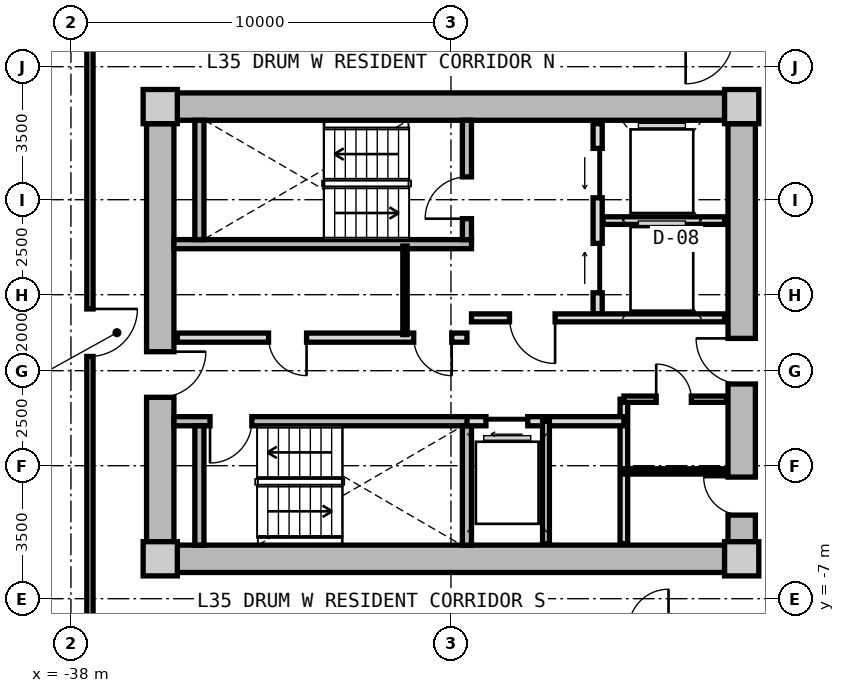
"""IFC4 building model, lengths in metres.
Left out: names, types, materials, properties, quantities, classifications, styles, units other than length and angle.
Written with IfcOpenShell. Run it as: python <this file> out.ifc"""

import sys

from ifc_helpers import new_model, si_unit, direction, frame, frame_2d, origin, origin_2d, place, context, subcontext, project, spatial, rectangle, extrude, source, transform, mapped, element, fill, save


model = new_model("IFC4")
c1 = context("Model", 3, precision=1e-05, world=origin(), true_north=direction((0.0, 1.0)))
c2 = subcontext(c1, "Body", "Model", "MODEL_VIEW")
j1 = project(units=[si_unit("LENGTHUNIT", "METRE"), si_unit("PLANEANGLEUNIT", "RADIAN")], contexts=[c1])
p1 = place(None, origin())
s1 = spatial("IfcSite", under=j1, at=p1, CompositionType="ELEMENT")
p2 = place(p1, origin())
s2 = spatial("IfcBuilding", under=s1, at=p2, CompositionType="ELEMENT")
p3 = place(p2, frame((0.0, 0.0, 114.55)))
s3 = spatial("IfcBuildingStorey", under=s2, at=p3, CompositionType="ELEMENT", Elevation=114.55)
m1 = source(origin(), c2, "Body", "SweptSolid", [
    extrude(rectangle(XDim=0.9, YDim=0.9, at=origin_2d()), origin(), (0.0, 0.0, 1.0), 3.05),
])
for number, where, z_axis, x_axis in (
    (1, (-35.65, -5.95, 0.0), (0.0, 0.0, 1.0), (1.0, 0.0, 0.0)),
    (2, (-20.35, -5.95, 0.0), (0.0, 0.0, 1.0), (1.0, 0.0, 0.0)),
    (3, (-20.35, 5.95, 0.0), (0.0, 0.0, 1.0), (1.0, 0.0, 0.0)),
    (4, (-35.65, 5.95, 0.0), (0.0, 0.0, 1.0), (1.0, 0.0, 0.0)),
):
    element("IfcColumn", number, at=place(p3, frame(where, z_axis=z_axis, x_axis=x_axis)), inside=s3, PredefinedType="COLUMN", context=c2, shape_type="MappedRepresentation", body=[
        mapped(m1, transform((0.0, 0.0, 0.0), x_axis=(1.0, 0.0, 0.0), y_axis=(0.0, 1.0, 0.0), z_axis=(0.0, 0.0, 1.0), scale=1.0)),
    ])
m2 = source(origin(), c2, "Body", "SweptSolid", [
    extrude(rectangle(XDim=14.4, YDim=0.72, at=frame_2d((7.2, 0.0))), origin(), (0.0, 0.0, 1.0), 2.79),
])
for number, where, z_axis, x_axis in (
    (5, (-35.2, 5.95, 0.0), (0.0, 0.0, 1.0), (1.0, 0.0, 0.0)),
    (6, (-20.8, -5.95, 0.0), (0.0, 0.0, 1.0), (-1.0, 0.0, 0.0)),
):
    element("IfcWall", number, at=place(p3, frame(where, z_axis=z_axis, x_axis=x_axis)), inside=s3, PredefinedType="SHEAR", context=c2, shape_type="MappedRepresentation", body=[
        mapped(m2, transform((0.0, 0.0, 0.0), x_axis=(1.0, 0.0, 0.0), y_axis=(0.0, 1.0, 0.0), z_axis=(0.0, 0.0, 1.0), scale=1.0)),
    ])
m3 = source(origin(), c2, "Body", "SweptSolid", [
    extrude(rectangle(XDim=11.0, YDim=0.72, at=frame_2d((5.5, 0.0))), origin(), (0.0, 0.0, 1.0), 2.79),
])
p4 = place(p3, frame((-35.65, -5.5, 0.0), z_axis=(0.0, 0.0, 1.0), x_axis=(0.0, 1.0, 0.0)))
e7 = element("IfcWall", 7, at=p4, inside=s3, PredefinedType="SHEAR", context=c2, shape_type="MappedRepresentation", body=[
    mapped(m3, transform((0.0, 0.0, 0.0), x_axis=(1.0, 0.0, 0.0), y_axis=(0.0, 1.0, 0.0), z_axis=(0.0, 0.0, 1.0), scale=1.0)),
])
p5 = place(p4, frame((3.8, 0.0, 0.0)))
e8 = element("IfcOpeningElement", 8, at=p5, cuts=e7, PredefinedType="OPENING", context=c2, shape_type="SweptSolid", body=[
    extrude(rectangle(XDim=1.2, YDim=2.15, at=frame_2d((0.6, 1.075))), frame((0.0, 0.37, 0.0), z_axis=(0.0, -1.0, 0.0), x_axis=(1.0, 0.0, 0.0)), (0.0, 0.0, 1.0), 0.74),
])
p6 = place(p3, frame((-20.35, 5.5, 0.0), z_axis=(0.0, 0.0, 1.0), x_axis=(0.0, -1.0, 0.0)))
e9 = element("IfcWall", 9, at=p6, inside=s3, PredefinedType="SHEAR", context=c2, shape_type="MappedRepresentation", body=[
    mapped(m3, transform((0.0, 0.0, 0.0), x_axis=(1.0, 0.0, 0.0), y_axis=(0.0, 1.0, 0.0), z_axis=(0.0, 0.0, 1.0), scale=1.0)),
])
p7 = place(p6, frame((5.65, 0.0, 0.0)))
e10 = element("IfcOpeningElement", 10, at=p7, cuts=e9, PredefinedType="OPENING", context=c2, shape_type="SweptSolid", body=[
    extrude(rectangle(XDim=1.2, YDim=2.15, at=frame_2d((0.6, 1.075))), frame((0.0, 0.37, 0.0), z_axis=(0.0, -1.0, 0.0), x_axis=(1.0, 0.0, 0.0)), (0.0, 0.0, 1.0), 0.74),
])
p8 = place(p6, frame((9.3, 0.0, 0.0)))
e11 = element("IfcOpeningElement", 11, at=p8, cuts=e9, PredefinedType="OPENING", context=c2, shape_type="SweptSolid", body=[
    extrude(rectangle(XDim=1.0, YDim=2.1, at=frame_2d((0.5, 1.05))), frame((0.0, 0.37, 0.0), z_axis=(0.0, -1.0, 0.0), x_axis=(1.0, 0.0, 0.0)), (0.0, 0.0, 1.0), 0.74),
])
m4 = source(origin(), c2, "Body", "SweptSolid", [
    extrude(rectangle(XDim=7.83, YDim=0.24, at=frame_2d((3.915, 0.0))), origin(), (0.0, 0.0, 1.0), 2.79),
])
p9 = place(p3, frame((-35.29, 2.33, 0.0), z_axis=(0.0, 0.0, 1.0), x_axis=(1.0, 0.0, 0.0)))
e12 = element("IfcWall", 12, at=p9, inside=s3, PredefinedType="PARTITIONING", context=c2, shape_type="MappedRepresentation", body=[
    mapped(m4, transform((0.0, 0.0, 0.0), x_axis=(1.0, 0.0, 0.0), y_axis=(0.0, 1.0, 0.0), z_axis=(0.0, 0.0, 1.0), scale=1.0)),
])
m5 = source(origin(), c2, "Body", "SweptSolid", [
    extrude(rectangle(XDim=3.14, YDim=0.24, at=frame_2d((1.57, 0.0))), origin(), (0.0, 0.0, 1.0), 2.79),
])
p10 = place(p3, frame((-34.62, 2.45, 0.0), z_axis=(0.0, 0.0, 1.0), x_axis=(0.0, 1.0, 0.0)))
e13 = element("IfcWall", 13, at=p10, inside=s3, PredefinedType="PARTITIONING", context=c2, shape_type="MappedRepresentation", body=[
    mapped(m5, transform((0.0, 0.0, 0.0), x_axis=(1.0, 0.0, 0.0), y_axis=(0.0, 1.0, 0.0), z_axis=(0.0, 0.0, 1.0), scale=1.0)),
])
p11 = place(p3, frame((-27.58, 2.45, 0.0), z_axis=(0.0, 0.0, 1.0), x_axis=(0.0, 1.0, 0.0)))
e14 = element("IfcWall", 14, at=p11, inside=s3, PredefinedType="PARTITIONING", context=c2, shape_type="MappedRepresentation", body=[
    mapped(m5, transform((0.0, 0.0, 0.0), x_axis=(1.0, 0.0, 0.0), y_axis=(0.0, 1.0, 0.0), z_axis=(0.0, 0.0, 1.0), scale=1.0)),
])
p12 = place(p11, frame((0.55, 0.0, 0.0)))
e15 = element("IfcOpeningElement", 15, at=p12, cuts=e14, PredefinedType="OPENING", context=c2, shape_type="SweptSolid", body=[
    extrude(rectangle(XDim=1.1, YDim=2.15, at=frame_2d((0.55, 1.075))), frame((0.0, 0.13, 0.0), z_axis=(0.0, -1.0, 0.0), x_axis=(1.0, 0.0, 0.0)), (0.0, 0.0, 1.0), 0.26),
])
p13 = place(p3, frame((-35.29, -2.33, 0.0), z_axis=(0.0, 0.0, 1.0), x_axis=(1.0, 0.0, 0.0)))
e16 = element("IfcWall", 16, at=p13, inside=s3, PredefinedType="PARTITIONING", context=c2, shape_type="MappedRepresentation", body=[
    mapped(m4, transform((0.0, 0.0, 0.0), x_axis=(1.0, 0.0, 0.0), y_axis=(0.0, 1.0, 0.0), z_axis=(0.0, 0.0, 1.0), scale=1.0)),
])
p14 = place(p13, frame((0.95, 0.0, 0.0)))
e17 = element("IfcOpeningElement", 17, at=p14, cuts=e16, PredefinedType="OPENING", context=c2, shape_type="SweptSolid", body=[
    extrude(rectangle(XDim=1.1, YDim=2.15, at=frame_2d((0.55, 1.075))), frame((0.0, 0.13, 0.0), z_axis=(0.0, -1.0, 0.0), x_axis=(1.0, 0.0, 0.0)), (0.0, 0.0, 1.0), 0.26),
])
for number, where, z_axis, x_axis in (
    (18, (-34.62, -5.59, 0.0), (0.0, 0.0, 1.0), (0.0, 1.0, 0.0)),
    (19, (-27.58, -5.59, 0.0), (0.0, 0.0, 1.0), (0.0, 1.0, 0.0)),
):
    element("IfcWall", number, at=place(p3, frame(where, z_axis=z_axis, x_axis=x_axis)), inside=s3, PredefinedType="PARTITIONING", context=c2, shape_type="MappedRepresentation", body=[
        mapped(m5, transform((0.0, 0.0, 0.0), x_axis=(1.0, 0.0, 0.0), y_axis=(0.0, 1.0, 0.0), z_axis=(0.0, 0.0, 1.0), scale=1.0)),
    ])
m6 = source(origin(), c2, "Body", "SweptSolid", [
    extrude(rectangle(XDim=5.0, YDim=0.24, at=frame_2d((2.5, 0.0))), origin(), (0.0, 0.0, 1.0), 2.775),
])
p15 = place(p3, frame((-24.14, 0.5, 0.0), z_axis=(0.0, 0.0, 1.0), x_axis=(0.0, 1.0, 0.0)))
e20 = element("IfcWall", 20, at=p15, inside=s3, PredefinedType="PARTITIONING", context=c2, shape_type="MappedRepresentation", body=[
    mapped(m6, transform((0.0, 0.0, 0.0), x_axis=(1.0, 0.0, 0.0), y_axis=(0.0, 1.0, 0.0), z_axis=(0.0, 0.0, 1.0), scale=1.0)),
])
p16 = place(p15, frame((3.05, 0.0, 0.0)))
e21 = element("IfcOpeningElement", 21, at=p16, cuts=e20, PredefinedType="OPENING", context=c2, shape_type="SweptSolid", body=[
    extrude(rectangle(XDim=1.3, YDim=2.2, at=frame_2d((0.65, 1.1))), frame((0.0, 0.13, 0.0), z_axis=(0.0, -1.0, 0.0), x_axis=(1.0, 0.0, 0.0)), (0.0, 0.0, 1.0), 0.26),
])
p17 = place(p15, frame((0.55, 0.0, 0.0)))
e22 = element("IfcOpeningElement", 22, at=p17, cuts=e20, PredefinedType="OPENING", context=c2, shape_type="SweptSolid", body=[
    extrude(rectangle(XDim=1.3, YDim=2.2, at=frame_2d((0.65, 1.1))), frame((0.0, 0.13, 0.0), z_axis=(0.0, -1.0, 0.0), x_axis=(1.0, 0.0, 0.0)), (0.0, 0.0, 1.0), 0.26),
])
m7 = source(origin(), c2, "Body", "SweptSolid", [
    extrude(rectangle(XDim=3.2, YDim=0.2, at=frame_2d((1.6, 0.0))), origin(), (0.0, 0.0, 1.0), 2.775),
])
p18 = place(p3, frame((-24.0, 2.95, 0.0), z_axis=(0.0, 0.0, 1.0), x_axis=(1.0, 0.0, 0.0)))
e23 = element("IfcWall", 23, at=p18, inside=s3, PredefinedType="PARTITIONING", context=c2, shape_type="MappedRepresentation", body=[
    mapped(m7, transform((0.0, 0.0, 0.0), x_axis=(1.0, 0.0, 0.0), y_axis=(0.0, 1.0, 0.0), z_axis=(0.0, 0.0, 1.0), scale=1.0)),
])
m8 = source(origin(), c2, "Body", "SweptSolid", [
    extrude(rectangle(XDim=6.66, YDim=0.21, at=frame_2d((3.33, 0.0))), origin(), (0.0, 0.0, 1.0), 2.775),
])
p19 = place(p3, frame((-27.46, 0.39, 0.0), z_axis=(0.0, 0.0, 1.0), x_axis=(1.0, 0.0, 0.0)))
e24 = element("IfcWall", 24, at=p19, inside=s3, PredefinedType="PARTITIONING", context=c2, shape_type="MappedRepresentation", body=[
    mapped(m8, transform((0.0, 0.0, 0.0), x_axis=(1.0, 0.0, 0.0), y_axis=(0.0, 1.0, 0.0), z_axis=(0.0, 0.0, 1.0), scale=1.0)),
])
p20 = place(p19, frame((1.0, 0.0, 0.0)))
e25 = element("IfcOpeningElement", 25, at=p20, cuts=e24, PredefinedType="OPENING", context=c2, shape_type="SweptSolid", body=[
    extrude(rectangle(XDim=1.2, YDim=2.15, at=frame_2d((0.6, 1.075))), frame((0.0, 0.115, 0.0), z_axis=(0.0, -1.0, 0.0), x_axis=(1.0, 0.0, 0.0)), (0.0, 0.0, 1.0), 0.23),
])
m9 = source(origin(), c2, "Body", "SweptSolid", [
    extrude(rectangle(XDim=7.62, YDim=0.24, at=frame_2d((3.81, 0.0))), origin(), (0.0, 0.0, 1.0), 2.775),
])
p21 = place(p3, frame((-35.2, -0.13, 0.0), z_axis=(0.0, 0.0, 1.0), x_axis=(1.0, 0.0, 0.0)))
e26 = element("IfcWall", 26, at=p21, inside=s3, PredefinedType="PARTITIONING", context=c2, shape_type="MappedRepresentation", body=[
    mapped(m9, transform((0.0, 0.0, 0.0), x_axis=(1.0, 0.0, 0.0), y_axis=(0.0, 1.0, 0.0), z_axis=(0.0, 0.0, 1.0), scale=1.0)),
])
p22 = place(p21, frame((6.22, 0.0, 0.0)))
e27 = element("IfcOpeningElement", 27, at=p22, cuts=e26, PredefinedType="OPENING", context=c2, shape_type="SweptSolid", body=[
    extrude(rectangle(XDim=1.0, YDim=2.1, at=frame_2d((0.5, 1.05))), frame((0.0, 0.13, 0.0), z_axis=(0.0, -1.0, 0.0), x_axis=(1.0, 0.0, 0.0)), (0.0, 0.0, 1.0), 0.26),
])
p23 = place(p21, frame((2.4, 0.0, 0.0)))
e28 = element("IfcOpeningElement", 28, at=p23, cuts=e26, PredefinedType="OPENING", context=c2, shape_type="SweptSolid", body=[
    extrude(rectangle(XDim=1.0, YDim=2.1, at=frame_2d((0.5, 1.05))), frame((0.0, 0.13, 0.0), z_axis=(0.0, -1.0, 0.0), x_axis=(1.0, 0.0, 0.0)), (0.0, 0.0, 1.0), 0.26),
])
m10 = source(origin(), c2, "Body", "SweptSolid", [
    extrude(rectangle(XDim=2.33, YDim=0.115, at=frame_2d((1.165, 0.0))), origin(), (0.0, 0.0, 1.0), 2.775),
])
p24 = place(p3, frame((-29.21, -0.05, 0.0), z_axis=(0.0, 0.0, 1.0), x_axis=(0.0, 1.0, 0.0)))
e29 = element("IfcWall", 29, at=p24, inside=s3, PredefinedType="PARTITIONING", context=c2, shape_type="MappedRepresentation", body=[
    mapped(m10, transform((0.0, 0.0, 0.0), x_axis=(1.0, 0.0, 0.0), y_axis=(0.0, 1.0, 0.0), z_axis=(0.0, 0.0, 1.0), scale=1.0)),
])
m11 = source(origin(), c2, "Body", "SweptSolid", [
    extrude(rectangle(XDim=3.8, YDim=0.2, at=frame_2d((1.9, 0.0))), origin(), (0.0, 0.0, 1.0), 2.775),
])
p25 = place(p3, frame((-23.45, -5.55, 0.0), z_axis=(0.0, 0.0, 1.0), x_axis=(0.0, 1.0, 0.0)))
e30 = element("IfcWall", 30, at=p25, inside=s3, PredefinedType="PARTITIONING", context=c2, shape_type="MappedRepresentation", body=[
    mapped(m11, transform((0.0, 0.0, 0.0), x_axis=(1.0, 0.0, 0.0), y_axis=(0.0, 1.0, 0.0), z_axis=(0.0, 0.0, 1.0), scale=1.0)),
])
m12 = source(origin(), c2, "Body", "SweptSolid", [
    extrude(rectangle(XDim=4.13, YDim=0.24, at=frame_2d((2.065, 0.0))), origin(), (0.0, 0.0, 1.0), 2.775),
])
p26 = place(p3, frame((-27.58, -2.33, 0.0), z_axis=(0.0, 0.0, 1.0), x_axis=(1.0, 0.0, 0.0)))
e31 = element("IfcWall", 31, at=p26, inside=s3, PredefinedType="PARTITIONING", context=c2, shape_type="MappedRepresentation", body=[
    mapped(m12, transform((0.0, 0.0, 0.0), x_axis=(1.0, 0.0, 0.0), y_axis=(0.0, 1.0, 0.0), z_axis=(0.0, 0.0, 1.0), scale=1.0)),
])
p27 = place(p26, frame((0.5, 0.0, 0.0)))
e32 = element("IfcOpeningElement", 32, at=p27, cuts=e31, PredefinedType="OPENING", context=c2, shape_type="SweptSolid", body=[
    extrude(rectangle(XDim=1.1, YDim=2.2, at=frame_2d((0.55, 1.1))), frame((0.0, 0.13, 0.0), z_axis=(0.0, -1.0, 0.0), x_axis=(1.0, 0.0, 0.0)), (0.0, 0.0, 1.0), 0.26),
])
m13 = source(origin(), c2, "Body", "SweptSolid", [
    extrude(rectangle(XDim=3.22, YDim=0.18, at=frame_2d((1.61, 0.0))), origin(), (0.0, 0.0, 1.0), 2.775),
])
p28 = place(p3, frame((-25.5, -5.55, 0.0), z_axis=(0.0, 0.0, 1.0), x_axis=(0.0, 1.0, 0.0)))
e33 = element("IfcWall", 33, at=p28, inside=s3, PredefinedType="PARTITIONING", context=c2, shape_type="MappedRepresentation", body=[
    mapped(m13, transform((0.0, 0.0, 0.0), x_axis=(1.0, 0.0, 0.0), y_axis=(0.0, 1.0, 0.0), z_axis=(0.0, 0.0, 1.0), scale=1.0)),
])
m14 = source(origin(), c2, "Body", "SweptSolid", [
    extrude(rectangle(XDim=2.7, YDim=0.165, at=frame_2d((1.35, 0.0))), origin(), (0.0, 0.0, 1.0), 2.775),
])
p29 = place(p3, frame((-23.45, -1.75, 0.0), z_axis=(0.0, 0.0, 1.0), x_axis=(1.0, 0.0, 0.0)))
e34 = element("IfcWall", 34, at=p29, inside=s3, PredefinedType="PARTITIONING", context=c2, shape_type="MappedRepresentation", body=[
    mapped(m14, transform((0.0, 0.0, 0.0), x_axis=(1.0, 0.0, 0.0), y_axis=(0.0, 1.0, 0.0), z_axis=(0.0, 0.0, 1.0), scale=1.0)),
])
p30 = place(p29, frame((0.85, 0.0, 0.0)))
e35 = element("IfcOpeningElement", 35, at=p30, cuts=e34, PredefinedType="OPENING", context=c2, shape_type="SweptSolid", body=[
    extrude(rectangle(XDim=0.925, YDim=2.1, at=frame_2d((0.462, 1.05))), frame((0.0, 0.093, 0.0), z_axis=(0.0, -1.0, 0.0), x_axis=(1.0, 0.0, 0.0)), (0.0, 0.0, 1.0), 0.185),
])
m15 = source(origin(), c2, "Body", "SweptSolid", [
    extrude(rectangle(XDim=2.7, YDim=0.14, at=frame_2d((1.35, 0.0))), origin(), (0.0, 0.0, 1.0), 2.775),
])
p31 = place(p3, frame((-23.45, -3.65, 0.0), z_axis=(0.0, 0.0, 1.0), x_axis=(1.0, 0.0, 0.0)))
e36 = element("IfcWall", 36, at=p31, inside=s3, PredefinedType="PARTITIONING", context=c2, shape_type="MappedRepresentation", body=[
    mapped(m15, transform((0.0, 0.0, 0.0), x_axis=(1.0, 0.0, 0.0), y_axis=(0.0, 1.0, 0.0), z_axis=(0.0, 0.0, 1.0), scale=1.0)),
])
m16 = source(origin(), c2, "Body", "SweptSolid", [
    extrude(rectangle(XDim=15.6, YDim=0.165, at=frame_2d((7.8, 0.0))), origin(), (0.0, 0.0, 1.0), 2.775),
])
p32 = place(p3, frame((-37.5, -7.8, 0.0), z_axis=(0.0, 0.0, 1.0), x_axis=(0.0, 1.0, 0.0)))
e37 = element("IfcWall", 37, at=p32, inside=s3, PredefinedType="PARTITIONING", context=c2, shape_type="MappedRepresentation", body=[
    mapped(m16, transform((0.0, 0.0, 0.0), x_axis=(1.0, 0.0, 0.0), y_axis=(0.0, 1.0, 0.0), z_axis=(0.0, 0.0, 1.0), scale=1.0)),
])
p33 = place(p32, frame((7.175, 0.0, 0.0)))
e38 = element("IfcOpeningElement", 38, at=p33, cuts=e37, PredefinedType="OPENING", context=c2, shape_type="SweptSolid", body=[
    extrude(rectangle(XDim=1.25, YDim=2.2, at=frame_2d((0.625, 1.1))), frame((0.0, 0.093, 0.0), z_axis=(0.0, -1.0, 0.0), x_axis=(1.0, 0.0, 0.0)), (0.0, 0.0, 1.0), 0.185),
])
m17 = source(origin(), c2, "Body", "SweptSolid", [
    extrude(rectangle(XDim=1.1, YDim=2.15, at=frame_2d((0.55, 1.075))), frame((0.0, 0.025, 0.0), z_axis=(0.0, -1.0, 0.0), x_axis=(1.0, 0.0, 0.0)), (0.0, 0.0, 1.0), 0.05),
])
p34 = place(p12, origin())
e39 = element("IfcDoor", 39, at=p34, inside=s3, OperationType="SINGLE_SWING_LEFT", PredefinedType="DOOR", context=c2, shape_type="MappedRepresentation", body=[
    mapped(m17, transform((0.0, 0.0, 0.0), x_axis=(1.0, 0.0, 0.0), y_axis=(0.0, 1.0, 0.0), z_axis=(0.0, 0.0, 1.0), scale=1.0)),
])
fill(e15, e39)
p35 = place(p14, frame((1.1, 0.0, 0.0), z_axis=(0.0, 0.0, 1.0), x_axis=(-1.0, 0.0, 0.0)))
e40 = element("IfcDoor", 40, at=p35, inside=s3, OperationType="SINGLE_SWING_RIGHT", PredefinedType="DOOR", context=c2, shape_type="MappedRepresentation", body=[
    mapped(m17, transform((0.0, 0.0, 0.0), x_axis=(1.0, 0.0, 0.0), y_axis=(0.0, 1.0, 0.0), z_axis=(0.0, 0.0, 1.0), scale=1.0)),
])
fill(e17, e40)
m18 = source(origin(), c2, "Body", "SweptSolid", [
    extrude(rectangle(XDim=1.3, YDim=2.2, at=frame_2d((0.65, 1.1))), frame((0.0, 0.025, 0.0), z_axis=(0.0, -1.0, 0.0), x_axis=(1.0, 0.0, 0.0)), (0.0, 0.0, 1.0), 0.05),
])
p36 = place(p16, origin())
e41 = element("IfcDoor", 41, at=p36, inside=s3, OperationType="SLIDING_TO_LEFT", PredefinedType="DOOR", context=c2, shape_type="MappedRepresentation", body=[
    mapped(m18, transform((0.0, 0.0, 0.0), x_axis=(1.0, 0.0, 0.0), y_axis=(0.0, 1.0, 0.0), z_axis=(0.0, 0.0, 1.0), scale=1.0)),
])
fill(e21, e41)
p37 = place(p17, origin())
e42 = element("IfcDoor", 42, at=p37, inside=s3, OperationType="SLIDING_TO_RIGHT", PredefinedType="DOOR", context=c2, shape_type="MappedRepresentation", body=[
    mapped(m18, transform((0.0, 0.0, 0.0), x_axis=(1.0, 0.0, 0.0), y_axis=(0.0, 1.0, 0.0), z_axis=(0.0, 0.0, 1.0), scale=1.0)),
])
fill(e22, e42)
m19 = source(origin(), c2, "Body", "SweptSolid", [
    extrude(rectangle(XDim=1.2, YDim=2.15, at=frame_2d((0.6, 1.075))), frame((0.0, 0.025, 0.0), z_axis=(0.0, -1.0, 0.0), x_axis=(1.0, 0.0, 0.0)), (0.0, 0.0, 1.0), 0.05),
])
p38 = place(p20, frame((1.2, 0.0, 0.0), z_axis=(0.0, 0.0, 1.0), x_axis=(-1.0, 0.0, 0.0)))
e43 = element("IfcDoor", 43, at=p38, inside=s3, OperationType="SINGLE_SWING_LEFT", PredefinedType="DOOR", context=c2, shape_type="MappedRepresentation", body=[
    mapped(m19, transform((0.0, 0.0, 0.0), x_axis=(1.0, 0.0, 0.0), y_axis=(0.0, 1.0, 0.0), z_axis=(0.0, 0.0, 1.0), scale=1.0)),
])
fill(e25, e43)
p39 = place(p5, frame((1.2, 0.0, 0.0), z_axis=(0.0, 0.0, 1.0), x_axis=(-1.0, 0.0, 0.0)))
e44 = element("IfcDoor", 44, at=p39, inside=s3, OperationType="SINGLE_SWING_LEFT", PredefinedType="DOOR", context=c2, shape_type="MappedRepresentation", body=[
    mapped(m19, transform((0.0, 0.0, 0.0), x_axis=(1.0, 0.0, 0.0), y_axis=(0.0, 1.0, 0.0), z_axis=(0.0, 0.0, 1.0), scale=1.0)),
])
fill(e8, e44)
p40 = place(p7, frame((1.2, 0.0, 0.0), z_axis=(0.0, 0.0, 1.0), x_axis=(-1.0, 0.0, 0.0)))
e45 = element("IfcDoor", 45, at=p40, inside=s3, OperationType="SINGLE_SWING_RIGHT", PredefinedType="DOOR", context=c2, shape_type="MappedRepresentation", body=[
    mapped(m19, transform((0.0, 0.0, 0.0), x_axis=(1.0, 0.0, 0.0), y_axis=(0.0, 1.0, 0.0), z_axis=(0.0, 0.0, 1.0), scale=1.0)),
])
fill(e10, e45)
m20 = source(origin(), c2, "Body", "SweptSolid", [
    extrude(rectangle(XDim=1.0, YDim=2.1, at=frame_2d((0.5, 1.05))), frame((0.0, 0.025, 0.0), z_axis=(0.0, -1.0, 0.0), x_axis=(1.0, 0.0, 0.0)), (0.0, 0.0, 1.0), 0.05),
])
p41 = place(p22, frame((1.0, 0.0, 0.0), z_axis=(0.0, 0.0, 1.0), x_axis=(-1.0, 0.0, 0.0)))
e46 = element("IfcDoor", 46, at=p41, inside=s3, OperationType="SINGLE_SWING_LEFT", PredefinedType="DOOR", context=c2, shape_type="MappedRepresentation", body=[
    mapped(m20, transform((0.0, 0.0, 0.0), x_axis=(1.0, 0.0, 0.0), y_axis=(0.0, 1.0, 0.0), z_axis=(0.0, 0.0, 1.0), scale=1.0)),
])
fill(e27, e46)
p42 = place(p23, frame((1.0, 0.0, 0.0), z_axis=(0.0, 0.0, 1.0), x_axis=(-1.0, 0.0, 0.0)))
e47 = element("IfcDoor", 47, at=p42, inside=s3, OperationType="SINGLE_SWING_LEFT", PredefinedType="DOOR", context=c2, shape_type="MappedRepresentation", body=[
    mapped(m20, transform((0.0, 0.0, 0.0), x_axis=(1.0, 0.0, 0.0), y_axis=(0.0, 1.0, 0.0), z_axis=(0.0, 0.0, 1.0), scale=1.0)),
])
fill(e28, e47)
m21 = source(origin(), c2, "Body", "SweptSolid", [
    extrude(rectangle(XDim=1.1, YDim=2.2, at=frame_2d((0.55, 1.1))), frame((0.0, 0.025, 0.0), z_axis=(0.0, -1.0, 0.0), x_axis=(1.0, 0.0, 0.0)), (0.0, 0.0, 1.0), 0.05),
])
p43 = place(p27, frame((1.1, 0.0, 0.0), z_axis=(0.0, 0.0, 1.0), x_axis=(-1.0, 0.0, 0.0)))
e48 = element("IfcDoor", 48, at=p43, inside=s3, OperationType="SLIDING_TO_LEFT", PredefinedType="DOOR", context=c2, shape_type="MappedRepresentation", body=[
    mapped(m21, transform((0.0, 0.0, 0.0), x_axis=(1.0, 0.0, 0.0), y_axis=(0.0, 1.0, 0.0), z_axis=(0.0, 0.0, 1.0), scale=1.0)),
])
fill(e32, e48)
m22 = source(origin(), c2, "Body", "SweptSolid", [
    extrude(rectangle(XDim=0.925, YDim=2.1, at=frame_2d((0.462, 1.05))), frame((0.0, 0.025, 0.0), z_axis=(0.0, -1.0, 0.0), x_axis=(1.0, 0.0, 0.0)), (0.0, 0.0, 1.0), 0.05),
])
p44 = place(p30, origin())
e49 = element("IfcDoor", 49, at=p44, inside=s3, OperationType="SINGLE_SWING_LEFT", PredefinedType="DOOR", context=c2, shape_type="MappedRepresentation", body=[
    mapped(m22, transform((0.0, 0.0, 0.0), x_axis=(1.0, 0.0, 0.0), y_axis=(0.0, 1.0, 0.0), z_axis=(0.0, 0.0, 1.0), scale=1.0)),
])
fill(e35, e49)
p45 = place(p8, frame((1.0, 0.0, 0.0), z_axis=(0.0, 0.0, 1.0), x_axis=(-1.0, 0.0, 0.0)))
e50 = element("IfcDoor", 50, at=p45, inside=s3, OperationType="SINGLE_SWING_RIGHT", PredefinedType="DOOR", context=c2, shape_type="MappedRepresentation", body=[
    mapped(m20, transform((0.0, 0.0, 0.0), x_axis=(1.0, 0.0, 0.0), y_axis=(0.0, 1.0, 0.0), z_axis=(0.0, 0.0, 1.0), scale=1.0)),
])
fill(e11, e50)
m23 = source(origin(), c2, "Body", "SweptSolid", [
    extrude(rectangle(XDim=1.25, YDim=2.2, at=frame_2d((0.625, 1.1))), frame((0.0, 0.025, 0.0), z_axis=(0.0, -1.0, 0.0), x_axis=(1.0, 0.0, 0.0)), (0.0, 0.0, 1.0), 0.05),
])
p46 = place(p33, frame((1.25, 0.0, 0.0), z_axis=(0.0, 0.0, 1.0), x_axis=(-1.0, 0.0, 0.0)))
e51 = element("IfcDoor", 51, at=p46, inside=s3, OperationType="SINGLE_SWING_LEFT", PredefinedType="DOOR", context=c2, shape_type="MappedRepresentation", body=[
    mapped(m23, transform((0.0, 0.0, 0.0), x_axis=(1.0, 0.0, 0.0), y_axis=(0.0, 1.0, 0.0), z_axis=(0.0, 0.0, 1.0), scale=1.0)),
])
fill(e38, e51)
save(model, sys.argv[1])
